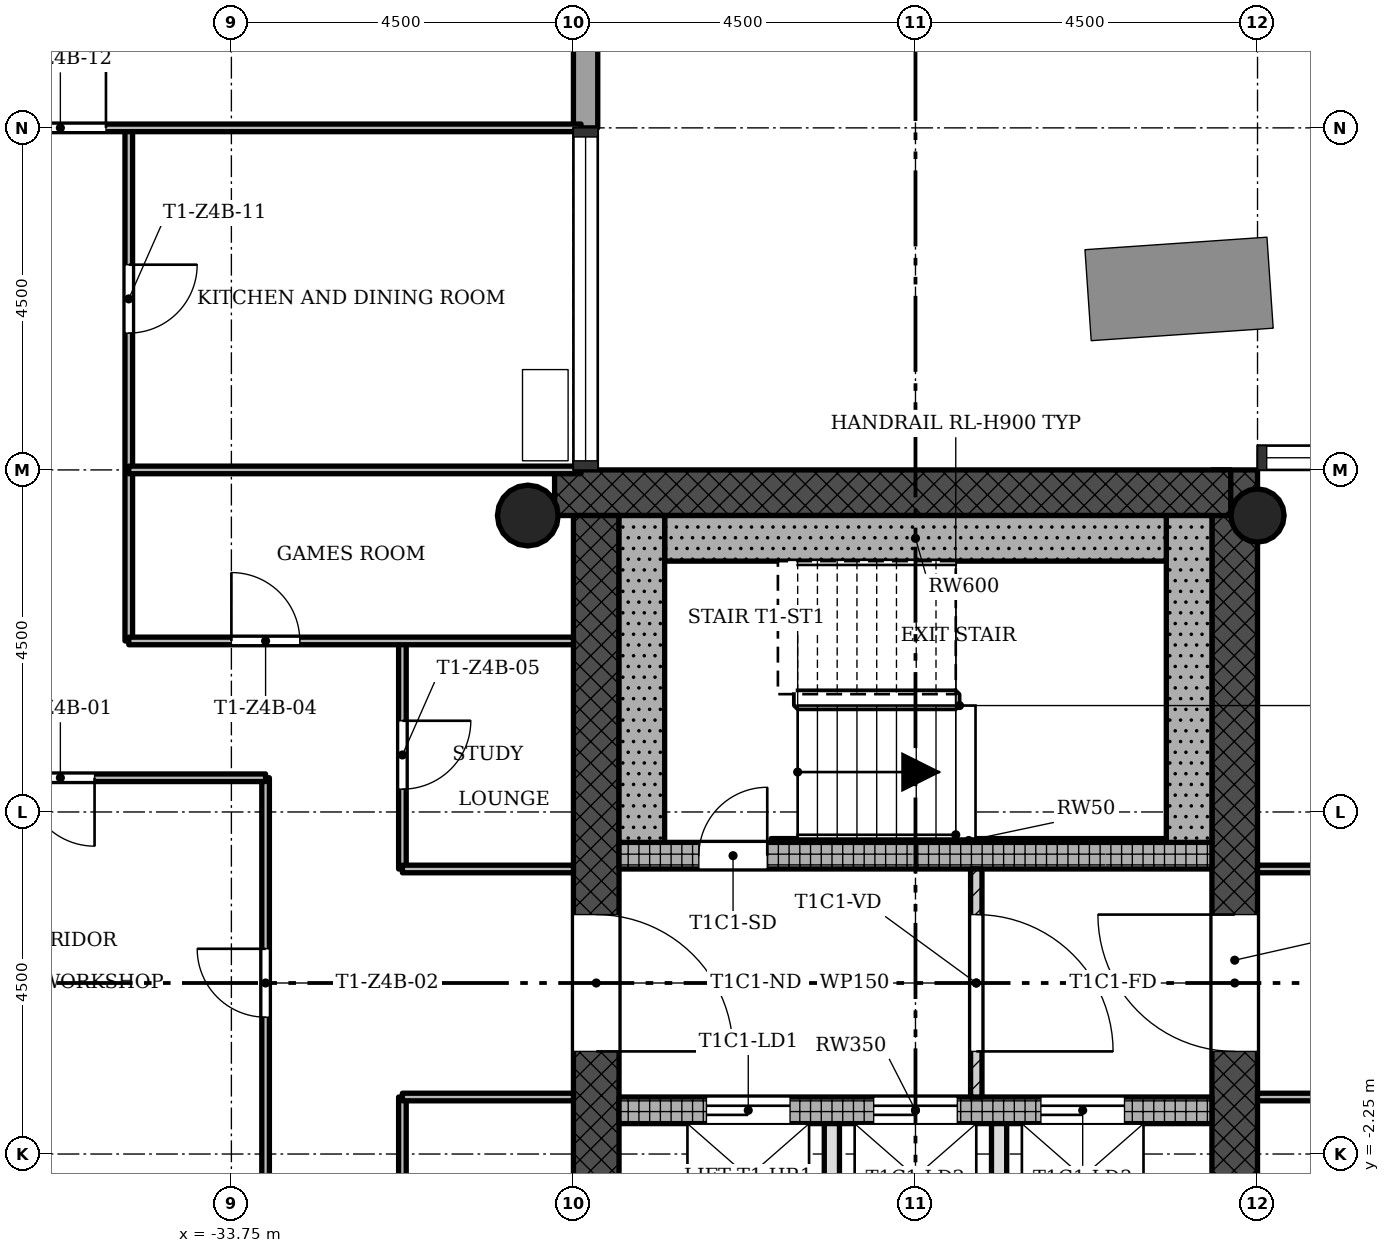
"""IFC4 building model, lengths in metres.
Left out: names, types, materials, properties, quantities, classifications, styles, units other than length and angle.
Written with IfcOpenShell. Run it as: python <this file> out.ifc"""

import sys

from ifc_helpers import new_model, si_unit, direction, frame, frame_2d, origin, origin_2d, place, context, subcontext, project, spatial, rectangle, hollow_circle, extrude, element, fill, save


model = new_model("IFC4")
c1 = context("Model", 3, precision=1e-05, world=origin(), true_north=direction((0.0, 1.0)))
c2 = subcontext(c1, "Body", "Model", "MODEL_VIEW")
j1 = project(units=[si_unit("LENGTHUNIT", "METRE"), si_unit("PLANEANGLEUNIT", "RADIAN")], contexts=[c1])
p1 = place(None, origin())
s1 = spatial("IfcSite", under=j1, at=p1, CompositionType="ELEMENT")
p2 = place(p1, origin())
s2 = spatial("IfcBuilding", under=s1, at=p2, CompositionType="ELEMENT")
p3 = place(p2, frame((0.0, 0.0, 230.0)))
s3 = spatial("IfcBuildingStorey", under=s2, at=p3, CompositionType="ELEMENT", Elevation=230.0)
p4 = place(p3, frame((-20.55, -6.15, 0.0), z_axis=(0.0, 0.0, 1.0), x_axis=(0.0, 1.0, 0.0)))
e1 = element("IfcWall", 1, at=p4, inside=s3, PredefinedType="SHEAR", context=c2, shape_type="SweptSolid", body=[
    extrude(rectangle(XDim=12.9, YDim=0.6, at=frame_2d((6.45, 0.0))), origin(), (0.0, 0.0, 1.0), 3.4),
])
p5 = place(p4, frame((5.25, 0.0, 0.0)))
e2 = element("IfcOpeningElement", 2, at=p5, cuts=e1, PredefinedType="OPENING", context=c2, shape_type="SweptSolid", body=[
    extrude(rectangle(XDim=1.8, YDim=2.1, at=frame_2d((0.9, 1.05))), frame((0.0, 0.31, 0.0), z_axis=(0.0, -1.0, 0.0), x_axis=(1.0, 0.0, 0.0)), (0.0, 0.0, 1.0), 0.62),
])
p6 = place(p3, frame((-20.602, 6.45, 0.0), z_axis=(0.0, 0.0, 1.0), x_axis=(-1.0, 0.0, 0.0)))
e3 = element("IfcWall", 3, at=p6, inside=s3, PredefinedType="SHEAR", context=c2, shape_type="SweptSolid", body=[
    extrude(rectangle(XDim=8.896, YDim=0.6, at=frame_2d((4.448, 0.0))), origin(), (0.0, 0.0, 1.0), 3.4),
])
p7 = place(p3, frame((-28.95, 6.15, 0.0), z_axis=(0.0, 0.0, 1.0), x_axis=(0.0, -1.0, 0.0)))
e4 = element("IfcWall", 4, at=p7, inside=s3, PredefinedType="SHEAR", context=c2, shape_type="SweptSolid", body=[
    extrude(rectangle(XDim=12.9, YDim=0.6, at=frame_2d((6.45, 0.0))), origin(), (0.0, 0.0, 1.0), 3.4),
])
p8 = place(p7, frame((5.25, 0.0, 0.0)))
e5 = element("IfcOpeningElement", 5, at=p8, cuts=e4, PredefinedType="OPENING", context=c2, shape_type="SweptSolid", body=[
    extrude(rectangle(XDim=1.8, YDim=2.1, at=frame_2d((0.9, 1.05))), frame((0.0, 0.31, 0.0), z_axis=(0.0, -1.0, 0.0), x_axis=(1.0, 0.0, 0.0)), (0.0, 0.0, 1.0), 0.62),
])
p9 = place(p3, frame((-28.65, -1.675, 0.0), z_axis=(0.0, 0.0, 1.0), x_axis=(1.0, 0.0, 0.0)))
e6 = element("IfcWall", 6, at=p9, inside=s3, PredefinedType="SHEAR", context=c2, shape_type="SweptSolid", body=[
    extrude(rectangle(XDim=7.8, YDim=0.35, at=frame_2d((3.9, 0.0))), origin(), (0.0, 0.0, 1.0), 3.4),
])
p10 = place(p9, frame((1.15, 0.0, 0.0)))
e7 = element("IfcOpeningElement", 7, at=p10, cuts=e6, PredefinedType="OPENING", context=c2, shape_type="SweptSolid", body=[
    extrude(rectangle(XDim=1.1, YDim=2.1, at=frame_2d((0.55, 1.05))), frame((0.0, 0.185, 0.0), z_axis=(0.0, -1.0, 0.0), x_axis=(1.0, 0.0, 0.0)), (0.0, 0.0, 1.0), 0.37),
])
p11 = place(p9, frame((3.35, 0.0, 0.0)))
e8 = element("IfcOpeningElement", 8, at=p11, cuts=e6, PredefinedType="OPENING", context=c2, shape_type="SweptSolid", body=[
    extrude(rectangle(XDim=1.1, YDim=2.1, at=frame_2d((0.55, 1.05))), frame((0.0, 0.185, 0.0), z_axis=(0.0, -1.0, 0.0), x_axis=(1.0, 0.0, 0.0)), (0.0, 0.0, 1.0), 0.37),
])
p12 = place(p9, frame((5.55, 0.0, 0.0)))
e9 = element("IfcOpeningElement", 9, at=p12, cuts=e6, PredefinedType="OPENING", context=c2, shape_type="SweptSolid", body=[
    extrude(rectangle(XDim=1.1, YDim=2.1, at=frame_2d((0.55, 1.05))), frame((0.0, 0.185, 0.0), z_axis=(0.0, -1.0, 0.0), x_axis=(1.0, 0.0, 0.0)), (0.0, 0.0, 1.0), 0.37),
])
p13 = place(p3, frame((-28.65, 1.675, 0.0), z_axis=(0.0, 0.0, 1.0), x_axis=(1.0, 0.0, 0.0)))
e10 = element("IfcWall", 10, at=p13, inside=s3, PredefinedType="SHEAR", context=c2, shape_type="SweptSolid", body=[
    extrude(rectangle(XDim=7.8, YDim=0.35, at=frame_2d((3.9, 0.0))), origin(), (0.0, 0.0, 1.0), 3.4),
])
p14 = place(p13, frame((1.05, 0.0, 0.0)))
e11 = element("IfcOpeningElement", 11, at=p14, cuts=e10, PredefinedType="OPENING", context=c2, shape_type="SweptSolid", body=[
    extrude(rectangle(XDim=0.9, YDim=2.1, at=frame_2d((0.45, 1.05))), frame((0.0, 0.185, 0.0), z_axis=(0.0, -1.0, 0.0), x_axis=(1.0, 0.0, 0.0)), (0.0, 0.0, 1.0), 0.37),
])
p15 = place(p3, frame((-20.25, 6.15, 0.0), z_axis=(0.0, 0.0, 1.0), x_axis=(1.0, 0.0, 0.0)))
e12 = element("IfcColumn", 12, at=p15, inside=s3, PredefinedType="COLUMN", context=c2, shape_type="SweptSolid", body=[
    extrude(hollow_circle(Radius=0.35, WallThickness=0.025, at=origin_2d()), origin(), (0.0, 0.0, 1.0), 3.4),
])
p16 = place(p3, frame((-29.85, 6.15, 0.0), z_axis=(0.0, 0.0, 1.0), x_axis=(1.0, 0.0, 0.0)))
e13 = element("IfcColumn", 13, at=p16, inside=s3, PredefinedType="COLUMN", context=c2, shape_type="SweptSolid", body=[
    extrude(hollow_circle(Radius=0.4, WallThickness=0.028, at=origin_2d()), origin(), (0.0, 0.0, 1.0), 3.4),
])
p17 = place(p3, frame((-29.09, 11.25, -0.3), z_axis=(0.0, 0.0, 1.0), x_axis=(0.0, 1.0, 0.0)))
e14 = element("IfcWall", 14, at=p17, inside=s3, PredefinedType="STANDARD", context=c2, shape_type="SweptSolid", body=[
    extrude(rectangle(XDim=1.82, YDim=0.32, at=frame_2d((0.91, 0.0))), origin(), (0.0, 0.0, 1.0), 3.4),
])
p18 = place(p3, frame((-23.95, -1.5, 0.0), z_axis=(0.0, 0.0, 1.0), x_axis=(0.0, 1.0, 0.0)))
e15 = element("IfcWall", 15, at=p18, inside=s3, PredefinedType="PARTITIONING", context=c2, shape_type="SweptSolid", body=[
    extrude(rectangle(XDim=3.0, YDim=0.15, at=frame_2d((1.5, 0.0))), origin(), (0.0, 0.0, 1.0), 2.98),
])
p19 = place(p18, frame((0.6, 0.0, 0.0)))
e16 = element("IfcOpeningElement", 16, at=p19, cuts=e15, PredefinedType="OPENING", context=c2, shape_type="SweptSolid", body=[
    extrude(rectangle(XDim=1.8, YDim=2.1, at=frame_2d((0.9, 1.05))), frame((0.0, 0.085, 0.0), z_axis=(0.0, -1.0, 0.0), x_axis=(1.0, 0.0, 0.0)), (0.0, 0.0, 1.0), 0.17),
])
for number, where, z_axis, x_axis in (
    (17, (-25.85, -6.15, 0.0), (0.0, 0.0, 1.0), (0.0, 1.0, 0.0)),
    (18, (-23.65, -6.15, 0.0), (0.0, 0.0, 1.0), (0.0, 1.0, 0.0)),
):
    element("IfcWall", number, at=place(p3, frame(where, z_axis=z_axis, x_axis=x_axis)), inside=s3, PredefinedType="SOLIDWALL", context=c2, shape_type="SweptSolid", body=[
        extrude(rectangle(XDim=4.3, YDim=0.2, at=frame_2d((2.15, 0.0))), origin(), (0.0, 0.0, 1.0), 2.98),
    ])
p20 = place(p3, frame((-35.1, 4.5, 0.0), z_axis=(0.0, 0.0, 1.0), x_axis=(0.0, 1.0, 0.0)))
e19 = element("IfcWall", 19, at=p20, inside=s3, PredefinedType="PARTITIONING", context=c2, shape_type="SweptSolid", body=[
    extrude(rectangle(XDim=6.75, YDim=0.1, at=frame_2d((3.375, 0.0))), origin(), (0.0, 0.0, 1.0), 2.98),
])
p21 = place(p20, frame((4.05, 0.0, 0.0)))
e20 = element("IfcOpeningElement", 20, at=p21, cuts=e19, PredefinedType="OPENING", context=c2, shape_type="SweptSolid", body=[
    extrude(rectangle(XDim=0.9, YDim=2.1, at=frame_2d((0.45, 1.05))), frame((0.0, 0.06, 0.0), z_axis=(0.0, -1.0, 0.0), x_axis=(1.0, 0.0, 0.0)), (0.0, 0.0, 1.0), 0.12),
])
p22 = place(p3, frame((-33.3, -2.7, 0.0), z_axis=(0.0, 0.0, 1.0), x_axis=(0.0, 1.0, 0.0)))
e21 = element("IfcWall", 21, at=p22, inside=s3, PredefinedType="PARTITIONING", context=c2, shape_type="SweptSolid", body=[
    extrude(rectangle(XDim=5.4, YDim=0.1, at=frame_2d((2.7, 0.0))), origin(), (0.0, 0.0, 1.0), 2.98),
])
p23 = place(p22, frame((2.25, 0.0, 0.0)))
e22 = element("IfcOpeningElement", 22, at=p23, cuts=e21, PredefinedType="OPENING", context=c2, shape_type="SweptSolid", body=[
    extrude(rectangle(XDim=0.9, YDim=2.1, at=frame_2d((0.45, 1.05))), frame((0.0, 0.06, 0.0), z_axis=(0.0, -1.0, 0.0), x_axis=(1.0, 0.0, 0.0)), (0.0, 0.0, 1.0), 0.12),
])
p24 = place(p3, frame((-31.5, -4.5, 0.0), z_axis=(0.0, 0.0, 1.0), x_axis=(0.0, 1.0, 0.0)))
e23 = element("IfcWall", 23, at=p24, inside=s3, PredefinedType="PARTITIONING", context=c2, shape_type="SweptSolid", body=[
    extrude(rectangle(XDim=3.0, YDim=0.1, at=frame_2d((1.5, 0.0))), origin(), (0.0, 0.0, 1.0), 2.98),
])
p25 = place(p3, frame((-31.5, 1.5, 0.0), z_axis=(0.0, 0.0, 1.0), x_axis=(0.0, 1.0, 0.0)))
e24 = element("IfcWall", 24, at=p25, inside=s3, PredefinedType="PARTITIONING", context=c2, shape_type="SweptSolid", body=[
    extrude(rectangle(XDim=3.0, YDim=0.1, at=frame_2d((1.5, 0.0))), origin(), (0.0, 0.0, 1.0), 2.98),
])
p26 = place(p25, frame((1.05, 0.0, 0.0)))
e25 = element("IfcOpeningElement", 25, at=p26, cuts=e24, PredefinedType="OPENING", context=c2, shape_type="SweptSolid", body=[
    extrude(rectangle(XDim=0.9, YDim=2.1, at=frame_2d((0.45, 1.05))), frame((0.0, 0.06, 0.0), z_axis=(0.0, -1.0, 0.0), x_axis=(1.0, 0.0, 0.0)), (0.0, 0.0, 1.0), 0.12),
])
p27 = place(p3, frame((-31.5, -1.5, 0.0), z_axis=(0.0, 0.0, 1.0), x_axis=(1.0, 0.0, 0.0)))
e26 = element("IfcWall", 26, at=p27, inside=s3, PredefinedType="PARTITIONING", context=c2, shape_type="SweptSolid", body=[
    extrude(rectangle(XDim=2.25, YDim=0.1, at=frame_2d((1.125, 0.0))), origin(), (0.0, 0.0, 1.0), 2.98),
])
p28 = place(p3, frame((-20.25, -1.5, 0.0), z_axis=(0.0, 0.0, 1.0), x_axis=(1.0, 0.0, 0.0)))
e27 = element("IfcWall", 27, at=p28, inside=s3, PredefinedType="PARTITIONING", context=c2, shape_type="SweptSolid", body=[
    extrude(rectangle(XDim=4.5, YDim=0.1, at=frame_2d((2.25, 0.0))), origin(), (0.0, 0.0, 1.0), 2.98),
])
p29 = place(p28, frame((1.8, 0.0, 0.0)))
e28 = element("IfcOpeningElement", 28, at=p29, cuts=e27, PredefinedType="OPENING", context=c2, shape_type="SweptSolid", body=[
    extrude(rectangle(XDim=0.9, YDim=2.1, at=frame_2d((0.45, 1.05))), frame((0.0, 0.06, 0.0), z_axis=(0.0, -1.0, 0.0), x_axis=(1.0, 0.0, 0.0)), (0.0, 0.0, 1.0), 0.12),
])
p30 = place(p3, frame((-31.5, 1.5, 0.0), z_axis=(0.0, 0.0, 1.0), x_axis=(1.0, 0.0, 0.0)))
e29 = element("IfcWall", 29, at=p30, inside=s3, PredefinedType="PARTITIONING", context=c2, shape_type="SweptSolid", body=[
    extrude(rectangle(XDim=2.25, YDim=0.1, at=frame_2d((1.125, 0.0))), origin(), (0.0, 0.0, 1.0), 2.98),
])
p31 = place(p3, frame((-20.25, 1.5, 0.0), z_axis=(0.0, 0.0, 1.0), x_axis=(1.0, 0.0, 0.0)))
e30 = element("IfcWall", 30, at=p31, inside=s3, PredefinedType="PARTITIONING", context=c2, shape_type="SweptSolid", body=[
    extrude(rectangle(XDim=4.5, YDim=0.1, at=frame_2d((2.25, 0.0))), origin(), (0.0, 0.0, 1.0), 2.98),
])
p32 = place(p31, frame((1.8, 0.0, 0.0)))
e31 = element("IfcOpeningElement", 31, at=p32, cuts=e30, PredefinedType="OPENING", context=c2, shape_type="SweptSolid", body=[
    extrude(rectangle(XDim=0.9, YDim=2.1, at=frame_2d((0.45, 1.05))), frame((0.0, 0.06, 0.0), z_axis=(0.0, -1.0, 0.0), x_axis=(1.0, 0.0, 0.0)), (0.0, 0.0, 1.0), 0.12),
])
p33 = place(p3, frame((-38.7, 2.7, 0.0), z_axis=(0.0, 0.0, 1.0), x_axis=(1.0, 0.0, 0.0)))
e32 = element("IfcWall", 32, at=p33, inside=s3, PredefinedType="PARTITIONING", context=c2, shape_type="SweptSolid", body=[
    extrude(rectangle(XDim=5.4, YDim=0.1, at=frame_2d((2.7, 0.0))), origin(), (0.0, 0.0, 1.0), 2.98),
])
p34 = place(p33, frame((2.25, 0.0, 0.0)))
e33 = element("IfcOpeningElement", 33, at=p34, cuts=e32, PredefinedType="OPENING", context=c2, shape_type="SweptSolid", body=[
    extrude(rectangle(XDim=0.9, YDim=2.1, at=frame_2d((0.45, 1.05))), frame((0.0, 0.06, 0.0), z_axis=(0.0, -1.0, 0.0), x_axis=(1.0, 0.0, 0.0)), (0.0, 0.0, 1.0), 0.12),
])
p35 = place(p3, frame((-35.1, 4.5, 0.0), z_axis=(0.0, 0.0, 1.0), x_axis=(1.0, 0.0, 0.0)))
e34 = element("IfcWall", 34, at=p35, inside=s3, PredefinedType="PARTITIONING", context=c2, shape_type="SweptSolid", body=[
    extrude(rectangle(XDim=5.85, YDim=0.1, at=frame_2d((2.925, 0.0))), origin(), (0.0, 0.0, 1.0), 2.98),
])
p36 = place(p35, frame((1.35, 0.0, 0.0)))
e35 = element("IfcOpeningElement", 35, at=p36, cuts=e34, PredefinedType="OPENING", context=c2, shape_type="SweptSolid", body=[
    extrude(rectangle(XDim=0.9, YDim=2.1, at=frame_2d((0.45, 1.05))), frame((0.0, 0.06, 0.0), z_axis=(0.0, -1.0, 0.0), x_axis=(1.0, 0.0, 0.0)), (0.0, 0.0, 1.0), 0.12),
])
p37 = place(p3, frame((-35.1, 6.75, 0.0), z_axis=(0.0, 0.0, 1.0), x_axis=(1.0, 0.0, 0.0)))
e36 = element("IfcWall", 36, at=p37, inside=s3, PredefinedType="PARTITIONING", context=c2, shape_type="SweptSolid", body=[
    extrude(rectangle(XDim=5.95, YDim=0.1, at=frame_2d((2.975, 0.0))), origin(), (0.0, 0.0, 1.0), 2.98),
])
p38 = place(p3, frame((-42.85, 11.25, 0.0), z_axis=(0.0, 0.0, 1.0), x_axis=(1.0, 0.0, 0.0)))
e37 = element("IfcWall", 37, at=p38, inside=s3, PredefinedType="PARTITIONING", context=c2, shape_type="SweptSolid", body=[
    extrude(rectangle(XDim=13.7, YDim=0.1, at=frame_2d((6.85, 0.0))), origin(), (0.0, 0.0, 1.0), 2.98),
])
p39 = place(p38, frame((6.25, 0.0, 0.0)))
e38 = element("IfcOpeningElement", 38, at=p39, cuts=e37, PredefinedType="OPENING", context=c2, shape_type="SweptSolid", body=[
    extrude(rectangle(XDim=1.2, YDim=2.1, at=frame_2d((0.6, 1.05))), frame((0.0, 0.06, 0.0), z_axis=(0.0, -1.0, 0.0), x_axis=(1.0, 0.0, 0.0)), (0.0, 0.0, 1.0), 0.12),
])
p40 = place(p3, frame((-21.15, 1.85, 0.0), z_axis=(0.0, 0.0, 1.0), x_axis=(0.0, 1.0, 0.0)))
e39 = element("IfcWall", 39, at=p40, inside=s3, PredefinedType="SHEAR", context=c2, shape_type="SweptSolid", body=[
    extrude(rectangle(XDim=4.3, YDim=0.6, at=frame_2d((2.15, 0.0))), origin(), (0.0, 0.0, 1.0), 3.4),
])
p41 = place(p3, frame((-28.05, 5.85, 0.0), z_axis=(0.0, 0.0, 1.0), x_axis=(1.0, 0.0, 0.0)))
e40 = element("IfcWall", 40, at=p41, inside=s3, PredefinedType="SHEAR", context=c2, shape_type="SweptSolid", body=[
    extrude(rectangle(XDim=6.6, YDim=0.6, at=frame_2d((3.3, 0.0))), origin(), (0.0, 0.0, 1.0), 3.4),
])
p42 = place(p3, frame((-28.35, 1.85, 0.0), z_axis=(0.0, 0.0, 1.0), x_axis=(0.0, 1.0, 0.0)))
e41 = element("IfcWall", 41, at=p42, inside=s3, PredefinedType="SHEAR", context=c2, shape_type="SweptSolid", body=[
    extrude(rectangle(XDim=4.3, YDim=0.6, at=frame_2d((2.15, 0.0))), origin(), (0.0, 0.0, 1.0), 3.4),
])
p43 = place(p3, frame((-26.65, 1.875, 0.0), z_axis=(0.0, 0.0, 1.0), x_axis=(1.0, 0.0, 0.0)))
e42 = element("IfcWall", 42, at=p43, inside=s3, PredefinedType="SHEAR", context=c2, shape_type="SweptSolid", body=[
    extrude(rectangle(XDim=5.2, YDim=0.05, at=frame_2d((2.6, 0.0))), origin(), (0.0, 0.0, 1.0), 3.4),
])
p44 = place(p19, origin())
e43 = element("IfcDoor", 43, at=p44, inside=s3, OperationType="SINGLE_SWING_LEFT", PredefinedType="DOOR", context=c2, shape_type="SweptSolid", body=[
    extrude(rectangle(XDim=1.8, YDim=2.1, at=frame_2d((0.9, 1.05))), frame((0.0, 0.025, 0.0), z_axis=(0.0, -1.0, 0.0), x_axis=(1.0, 0.0, 0.0)), (0.0, 0.0, 1.0), 0.05),
])
fill(e16, e43)
p45 = place(p34, origin())
e44 = element("IfcDoor", 44, at=p45, inside=s3, OperationType="SINGLE_SWING_RIGHT", PredefinedType="DOOR", context=c2, shape_type="SweptSolid", body=[
    extrude(rectangle(XDim=0.9, YDim=2.1, at=frame_2d((0.45, 1.05))), frame((0.0, 0.025, 0.0), z_axis=(0.0, -1.0, 0.0), x_axis=(1.0, 0.0, 0.0)), (0.0, 0.0, 1.0), 0.05),
])
fill(e33, e44)
p46 = place(p23, origin())
e45 = element("IfcDoor", 45, at=p46, inside=s3, OperationType="SINGLE_SWING_LEFT", PredefinedType="DOOR", context=c2, shape_type="SweptSolid", body=[
    extrude(rectangle(XDim=0.9, YDim=2.1, at=frame_2d((0.45, 1.05))), frame((0.0, 0.025, 0.0), z_axis=(0.0, -1.0, 0.0), x_axis=(1.0, 0.0, 0.0)), (0.0, 0.0, 1.0), 0.05),
])
fill(e22, e45)
p47 = place(p36, origin())
e46 = element("IfcDoor", 46, at=p47, inside=s3, OperationType="SINGLE_SWING_RIGHT", PredefinedType="DOOR", context=c2, shape_type="SweptSolid", body=[
    extrude(rectangle(XDim=0.9, YDim=2.1, at=frame_2d((0.45, 1.05))), frame((0.0, 0.025, 0.0), z_axis=(0.0, -1.0, 0.0), x_axis=(1.0, 0.0, 0.0)), (0.0, 0.0, 1.0), 0.05),
])
fill(e35, e46)
p48 = place(p26, origin())
e47 = element("IfcDoor", 47, at=p48, inside=s3, OperationType="SINGLE_SWING_RIGHT", PredefinedType="DOOR", context=c2, shape_type="SweptSolid", body=[
    extrude(rectangle(XDim=0.9, YDim=2.1, at=frame_2d((0.45, 1.05))), frame((0.0, 0.025, 0.0), z_axis=(0.0, -1.0, 0.0), x_axis=(1.0, 0.0, 0.0)), (0.0, 0.0, 1.0), 0.05),
])
fill(e25, e47)
p49 = place(p21, origin())
e48 = element("IfcDoor", 48, at=p49, inside=s3, OperationType="SINGLE_SWING_RIGHT", PredefinedType="DOOR", context=c2, shape_type="SweptSolid", body=[
    extrude(rectangle(XDim=0.9, YDim=2.1, at=frame_2d((0.45, 1.05))), frame((0.0, 0.025, 0.0), z_axis=(0.0, -1.0, 0.0), x_axis=(1.0, 0.0, 0.0)), (0.0, 0.0, 1.0), 0.05),
])
fill(e20, e48)
p50 = place(p39, origin())
e49 = element("IfcDoor", 49, at=p50, inside=s3, OperationType="SINGLE_SWING_LEFT", PredefinedType="DOOR", context=c2, shape_type="SweptSolid", body=[
    extrude(rectangle(XDim=1.2, YDim=2.1, at=frame_2d((0.6, 1.05))), frame((0.0, 0.025, 0.0), z_axis=(0.0, -1.0, 0.0), x_axis=(1.0, 0.0, 0.0)), (0.0, 0.0, 1.0), 0.05),
])
fill(e38, e49)
p51 = place(p14, origin())
e50 = element("IfcDoor", 50, at=p51, inside=s3, OperationType="SINGLE_SWING_LEFT", PredefinedType="DOOR", context=c2, shape_type="SweptSolid", body=[
    extrude(rectangle(XDim=0.9, YDim=2.1, at=frame_2d((0.45, 1.05))), frame((0.0, 0.025, 0.0), z_axis=(0.0, -1.0, 0.0), x_axis=(1.0, 0.0, 0.0)), (0.0, 0.0, 1.0), 0.05),
])
fill(e11, e50)
p52 = place(p10, origin())
e51 = element("IfcDoor", 51, at=p52, inside=s3, OperationType="SLIDING_TO_LEFT", PredefinedType="DOOR", context=c2, shape_type="SweptSolid", body=[
    extrude(rectangle(XDim=1.1, YDim=2.1, at=frame_2d((0.55, 1.05))), frame((0.0, 0.025, 0.0), z_axis=(0.0, -1.0, 0.0), x_axis=(1.0, 0.0, 0.0)), (0.0, 0.0, 1.0), 0.05),
])
fill(e7, e51)
p53 = place(p11, origin())
e52 = element("IfcDoor", 52, at=p53, inside=s3, OperationType="SLIDING_TO_LEFT", PredefinedType="DOOR", context=c2, shape_type="SweptSolid", body=[
    extrude(rectangle(XDim=1.1, YDim=2.1, at=frame_2d((0.55, 1.05))), frame((0.0, 0.025, 0.0), z_axis=(0.0, -1.0, 0.0), x_axis=(1.0, 0.0, 0.0)), (0.0, 0.0, 1.0), 0.05),
])
fill(e8, e52)
p54 = place(p12, origin())
e53 = element("IfcDoor", 53, at=p54, inside=s3, OperationType="SLIDING_TO_LEFT", PredefinedType="DOOR", context=c2, shape_type="SweptSolid", body=[
    extrude(rectangle(XDim=1.1, YDim=2.1, at=frame_2d((0.55, 1.05))), frame((0.0, 0.025, 0.0), z_axis=(0.0, -1.0, 0.0), x_axis=(1.0, 0.0, 0.0)), (0.0, 0.0, 1.0), 0.05),
])
fill(e9, e53)
p55 = place(p8, origin())
e54 = element("IfcDoor", 54, at=p55, inside=s3, OperationType="SINGLE_SWING_LEFT", PredefinedType="DOOR", context=c2, shape_type="SweptSolid", body=[
    extrude(rectangle(XDim=1.8, YDim=2.1, at=frame_2d((0.9, 1.05))), frame((0.0, 0.025, 0.0), z_axis=(0.0, -1.0, 0.0), x_axis=(1.0, 0.0, 0.0)), (0.0, 0.0, 1.0), 0.05),
])
fill(e5, e54)
p56 = place(p5, origin())
e55 = element("IfcDoor", 55, at=p56, inside=s3, OperationType="SINGLE_SWING_LEFT", PredefinedType="DOOR", context=c2, shape_type="SweptSolid", body=[
    extrude(rectangle(XDim=1.8, YDim=2.1, at=frame_2d((0.9, 1.05))), frame((0.0, 0.025, 0.0), z_axis=(0.0, -1.0, 0.0), x_axis=(1.0, 0.0, 0.0)), (0.0, 0.0, 1.0), 0.05),
])
fill(e2, e55)
save(model, sys.argv[1])
